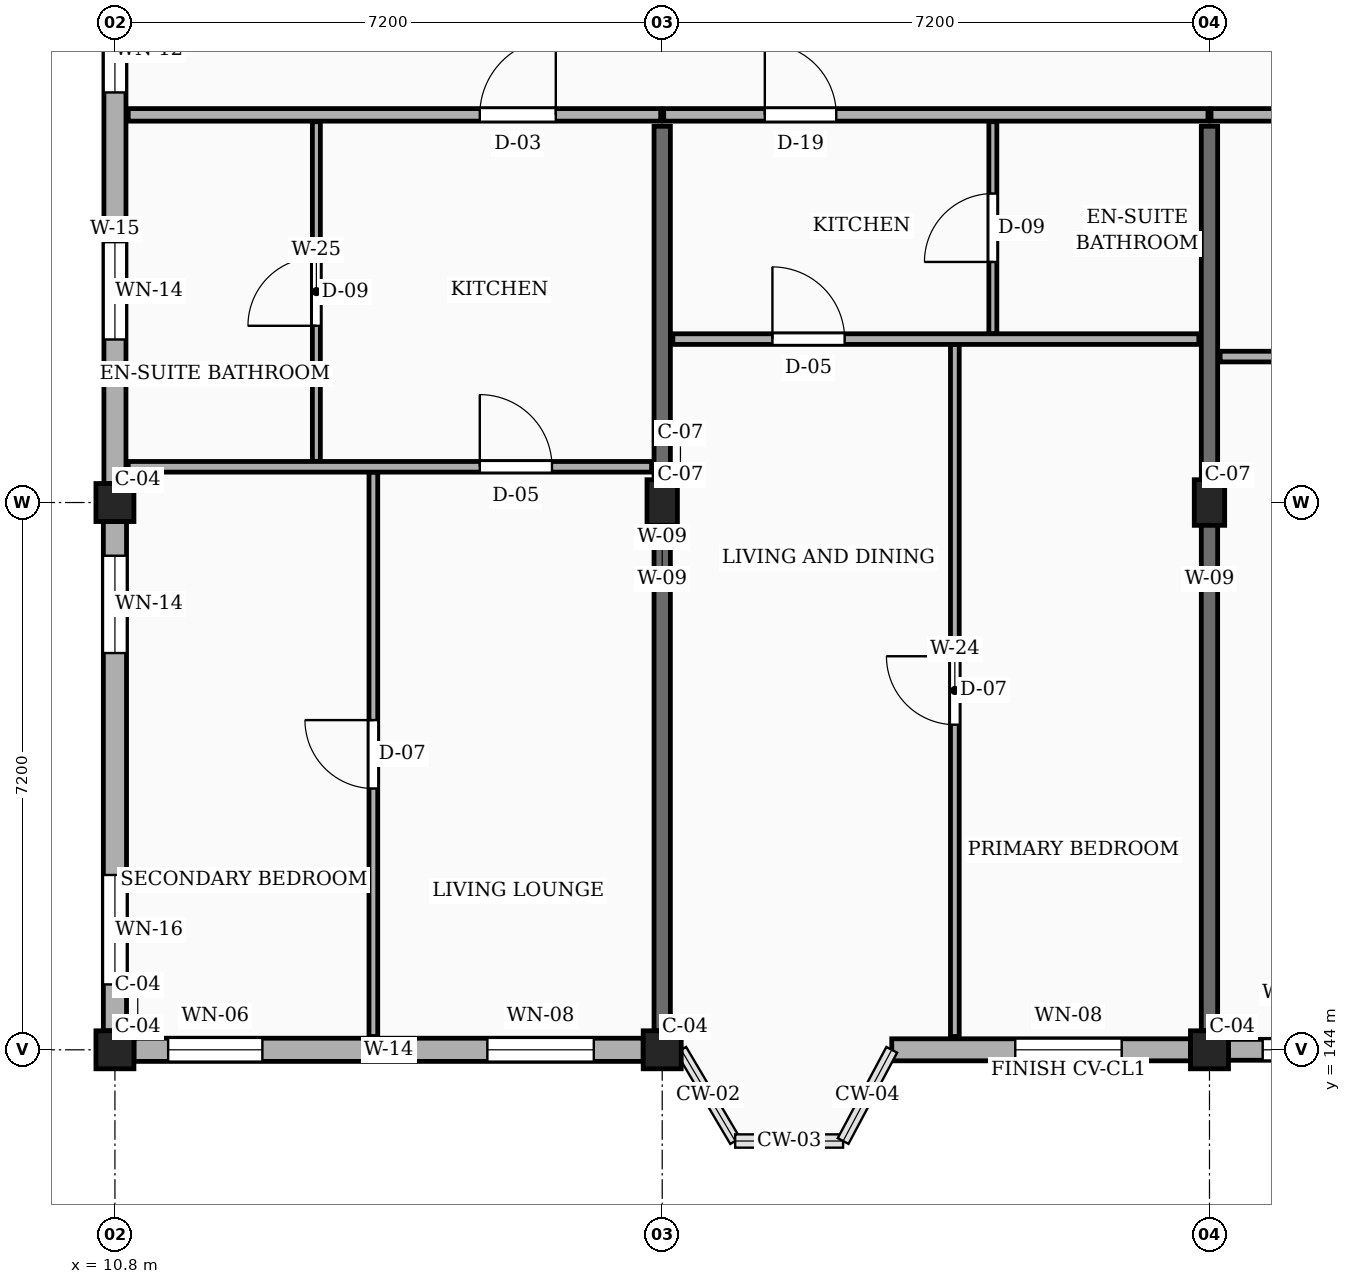
"""IFC4 building model, lengths in metres.
Left out: names, types, materials, properties, quantities, classifications, styles, units other than length and angle.
Written with IfcOpenShell. Run it as: python <this file> out.ifc"""

import sys

from ifc_helpers import new_model, si_unit, direction, frame, frame_2d, origin, origin_2d, place, context, subcontext, project, spatial, rectangle, extrude, element, fill, save


model = new_model("IFC4")
c1 = context("Model", 3, precision=1e-05, world=origin(), true_north=direction((0.0, 1.0)))
c2 = subcontext(c1, "Body", "Model", "MODEL_VIEW")
j1 = project(units=[si_unit("LENGTHUNIT", "METRE"), si_unit("PLANEANGLEUNIT", "RADIAN")], contexts=[c1])
p1 = place(None, origin())
s1 = spatial("IfcSite", under=j1, at=p1, CompositionType="ELEMENT")
p2 = place(p1, origin())
s2 = spatial("IfcBuilding", under=s1, at=p2, CompositionType="ELEMENT")
p3 = place(p2, frame((0.0, 0.0, 29.7)))
s3 = spatial("IfcBuildingStorey", under=s2, at=p3, CompositionType="ELEMENT", Elevation=29.7)
for number, where, z_axis, x_axis in (
    (1, (10.8, 144.0, 0.0), (0.0, 0.0, 1.0), (1.0, 0.0, 0.0)),
    (2, (10.8, 151.2, 0.0), (0.0, 0.0, 1.0), (1.0, 0.0, 0.0)),
    (3, (18.0, 144.0, 0.0), (0.0, 0.0, 1.0), (1.0, 0.0, 0.0)),
):
    element("IfcColumn", number, at=place(p3, frame(where, z_axis=z_axis, x_axis=x_axis)), inside=s3, PredefinedType="COLUMN", context=c2, shape_type="SweptSolid", body=[
        extrude(rectangle(XDim=0.5, YDim=0.5, at=origin_2d()), origin(), (0.0, 0.0, 1.0), 3.15),
    ])
p4 = place(p3, frame((18.0, 151.2, 0.0), z_axis=(0.0, 0.0, 1.0), x_axis=(1.0, 0.0, 0.0)))
e4 = element("IfcColumn", 4, at=p4, inside=s3, PredefinedType="COLUMN", context=c2, shape_type="SweptSolid", body=[
    extrude(rectangle(XDim=0.4, YDim=0.6, at=origin_2d()), origin(), (0.0, 0.0, 1.0), 3.15),
])
p5 = place(p3, frame((25.2, 144.0, 0.0), z_axis=(0.0, 0.0, 1.0), x_axis=(1.0, 0.0, 0.0)))
e5 = element("IfcColumn", 5, at=p5, inside=s3, PredefinedType="COLUMN", context=c2, shape_type="SweptSolid", body=[
    extrude(rectangle(XDim=0.5, YDim=0.5, at=origin_2d()), origin(), (0.0, 0.0, 1.0), 3.15),
])
p6 = place(p3, frame((25.2, 151.2, 0.0), z_axis=(0.0, 0.0, 1.0), x_axis=(1.0, 0.0, 0.0)))
e6 = element("IfcColumn", 6, at=p6, inside=s3, PredefinedType="COLUMN", context=c2, shape_type="SweptSolid", body=[
    extrude(rectangle(XDim=0.4, YDim=0.6, at=origin_2d()), origin(), (0.0, 0.0, 1.0), 3.15),
])
for number, where, z_axis, x_axis in (
    (7, (18.0, 144.25, 0.0), (0.0, 0.0, 1.0), (0.0, 1.0, 0.0)),
    (8, (25.2, 144.25, 0.0), (0.0, 0.0, 1.0), (0.0, 1.0, 0.0)),
):
    element("IfcWall", number, at=place(p3, frame(where, z_axis=z_axis, x_axis=x_axis)), inside=s3, PredefinedType="SOLIDWALL", context=c2, shape_type="SweptSolid", body=[
        extrude(rectangle(XDim=11.9, YDim=0.215, at=frame_2d((5.95, 0.0))), origin(), (0.0, 0.0, 1.0), 2.185),
    ])
p7 = place(p3, frame((11.05, 144.0, 0.0), z_axis=(0.0, 0.0, 1.0), x_axis=(1.0, 0.0, 0.0)))
e9 = element("IfcWall", 9, at=p7, inside=s3, PredefinedType="SOLIDWALL", context=c2, shape_type="SweptSolid", body=[
    extrude(rectangle(XDim=6.7, YDim=0.305, at=frame_2d((3.35, 0.0))), origin(), (0.0, 0.0, 1.0), 2.455),
])
p8 = place(p7, frame((0.45, 0.0, 0.78)))
e10 = element("IfcOpeningElement", 10, at=p8, cuts=e9, PredefinedType="OPENING", context=c2, shape_type="SweptSolid", body=[
    extrude(rectangle(XDim=1.24, YDim=1.15, at=frame_2d((0.62, 0.575))), frame((0.0, 0.163, 0.0), z_axis=(0.0, -1.0, 0.0), x_axis=(1.0, 0.0, 0.0)), (0.0, 0.0, 1.0), 0.325),
])
p9 = place(p7, frame((4.65, 0.0, 0.78)))
e11 = element("IfcOpeningElement", 11, at=p9, cuts=e9, PredefinedType="OPENING", context=c2, shape_type="SweptSolid", body=[
    extrude(rectangle(XDim=1.4, YDim=1.15, at=frame_2d((0.7, 0.575))), frame((0.0, 0.163, 0.0), z_axis=(0.0, -1.0, 0.0), x_axis=(1.0, 0.0, 0.0)), (0.0, 0.0, 1.0), 0.325),
])
p10 = place(p3, frame((21.02, 144.0, 0.0), z_axis=(0.0, 0.0, 1.0), x_axis=(1.0, 0.0, 0.0)))
e12 = element("IfcWall", 12, at=p10, inside=s3, PredefinedType="SOLIDWALL", context=c2, shape_type="SweptSolid", body=[
    extrude(rectangle(XDim=3.93, YDim=0.29, at=frame_2d((1.965, 0.0))), origin(), (0.0, 0.0, 1.0), 2.455),
])
p11 = place(p10, frame((1.625, 0.0, 0.78)))
e13 = element("IfcOpeningElement", 13, at=p11, cuts=e12, PredefinedType="OPENING", context=c2, shape_type="SweptSolid", body=[
    extrude(rectangle(XDim=1.4, YDim=1.15, at=frame_2d((0.7, 0.575))), frame((0.0, 0.155, 0.0), z_axis=(0.0, -1.0, 0.0), x_axis=(1.0, 0.0, 0.0)), (0.0, 0.0, 1.0), 0.31),
])
p12 = place(p3, frame((25.45, 144.0, 0.0), z_axis=(0.0, 0.0, 1.0), x_axis=(1.0, 0.0, 0.0)))
e14 = element("IfcWall", 14, at=p12, inside=s3, PredefinedType="SOLIDWALL", context=c2, shape_type="SweptSolid", body=[
    extrude(rectangle(XDim=6.7, YDim=0.275, at=frame_2d((3.35, 0.0))), origin(), (0.0, 0.0, 1.0), 2.455),
])
p13 = place(p12, frame((0.45, 0.0, 0.78)))
e15 = element("IfcOpeningElement", 15, at=p13, cuts=e14, PredefinedType="OPENING", context=c2, shape_type="SweptSolid", body=[
    extrude(rectangle(XDim=0.88, YDim=1.26, at=frame_2d((0.44, 0.63))), frame((0.0, 0.147, 0.0), z_axis=(0.0, -1.0, 0.0), x_axis=(1.0, 0.0, 0.0)), (0.0, 0.0, 1.0), 0.295),
])
p14 = place(p12, frame((4.65, 0.0, 0.78)))
e16 = element("IfcOpeningElement", 16, at=p14, cuts=e14, PredefinedType="OPENING", context=c2, shape_type="SweptSolid", body=[
    extrude(rectangle(XDim=1.04, YDim=1.26, at=frame_2d((0.52, 0.63))), frame((0.0, 0.147, 0.0), z_axis=(0.0, -1.0, 0.0), x_axis=(1.0, 0.0, 0.0)), (0.0, 0.0, 1.0), 0.295),
])
p15 = place(p3, frame((10.8, 158.15, 0.0), z_axis=(0.0, 0.0, 1.0), x_axis=(0.0, -1.0, 0.0)))
e17 = element("IfcWall", 17, at=p15, inside=s3, PredefinedType="SOLIDWALL", context=c2, shape_type="SweptSolid", body=[
    extrude(rectangle(XDim=6.7, YDim=0.29, at=frame_2d((3.35, 0.0))), origin(), (0.0, 0.0, 1.0), 2.455),
])
p16 = place(p15, frame((0.435, 0.0, 0.78)))
e18 = element("IfcOpeningElement", 18, at=p16, cuts=e17, PredefinedType="OPENING", context=c2, shape_type="SweptSolid", body=[
    extrude(rectangle(XDim=1.12, YDim=1.26, at=frame_2d((0.56, 0.63))), frame((0.0, 0.155, 0.0), z_axis=(0.0, -1.0, 0.0), x_axis=(1.0, 0.0, 0.0)), (0.0, 0.0, 1.0), 0.31),
])
p17 = place(p15, frame((3.525, 0.0, 0.78)))
e19 = element("IfcOpeningElement", 19, at=p17, cuts=e17, PredefinedType="OPENING", context=c2, shape_type="SweptSolid", body=[
    extrude(rectangle(XDim=1.28, YDim=1.26, at=frame_2d((0.64, 0.63))), frame((0.0, 0.155, 0.0), z_axis=(0.0, -1.0, 0.0), x_axis=(1.0, 0.0, 0.0)), (0.0, 0.0, 1.0), 0.31),
])
p18 = place(p3, frame((10.8, 150.95, 0.0), z_axis=(0.0, 0.0, 1.0), x_axis=(0.0, -1.0, 0.0)))
e20 = element("IfcWall", 20, at=p18, inside=s3, PredefinedType="SOLIDWALL", context=c2, shape_type="SweptSolid", body=[
    extrude(rectangle(XDim=6.7, YDim=0.305, at=frame_2d((3.35, 0.0))), origin(), (0.0, 0.0, 1.0), 2.455),
])
p19 = place(p18, frame((0.45, 0.0, 0.78)))
e21 = element("IfcOpeningElement", 21, at=p19, cuts=e20, PredefinedType="OPENING", context=c2, shape_type="SweptSolid", body=[
    extrude(rectangle(XDim=1.28, YDim=1.26, at=frame_2d((0.64, 0.63))), frame((0.0, 0.163, 0.0), z_axis=(0.0, -1.0, 0.0), x_axis=(1.0, 0.0, 0.0)), (0.0, 0.0, 1.0), 0.325),
])
p20 = place(p18, frame((4.65, 0.0, 0.78)))
e22 = element("IfcOpeningElement", 22, at=p20, cuts=e20, PredefinedType="OPENING", context=c2, shape_type="SweptSolid", body=[
    extrude(rectangle(XDim=1.44, YDim=1.26, at=frame_2d((0.72, 0.63))), frame((0.0, 0.163, 0.0), z_axis=(0.0, -1.0, 0.0), x_axis=(1.0, 0.0, 0.0)), (0.0, 0.0, 1.0), 0.325),
])
p21 = place(p3, frame((10.975, 156.3, 0.0), z_axis=(0.0, 0.0, 1.0), x_axis=(1.0, 0.0, 0.0)))
e23 = element("IfcWall", 23, at=p21, inside=s3, PredefinedType="PARTITIONING", context=c2, shape_type="SweptSolid", body=[
    extrude(rectangle(XDim=7.005, YDim=0.165, at=frame_2d((3.502, 0.0))), origin(), (0.0, 0.0, 1.0), 2.32),
])
p22 = place(p21, frame((4.625, 0.0, 0.0)))
e24 = element("IfcOpeningElement", 24, at=p22, cuts=e23, PredefinedType="OPENING", context=c2, shape_type="SweptSolid", body=[
    extrude(rectangle(XDim=1.0, YDim=2.15, at=frame_2d((0.5, 1.075))), frame((0.0, 0.093, 0.0), z_axis=(0.0, -1.0, 0.0), x_axis=(1.0, 0.0, 0.0)), (0.0, 0.0, 1.0), 0.185),
])
p23 = place(p3, frame((18.02, 156.3, 0.0), z_axis=(0.0, 0.0, 1.0), x_axis=(1.0, 0.0, 0.0)))
e25 = element("IfcWall", 25, at=p23, inside=s3, PredefinedType="PARTITIONING", context=c2, shape_type="SweptSolid", body=[
    extrude(rectangle(XDim=7.16, YDim=0.165, at=frame_2d((3.58, 0.0))), origin(), (0.0, 0.0, 1.0), 2.32),
])
p24 = place(p23, frame((1.33, 0.0, 0.0)))
e26 = element("IfcOpeningElement", 26, at=p24, cuts=e25, PredefinedType="OPENING", context=c2, shape_type="SweptSolid", body=[
    extrude(rectangle(XDim=0.94, YDim=2.12, at=frame_2d((0.47, 1.06))), frame((0.0, 0.093, 0.0), z_axis=(0.0, -1.0, 0.0), x_axis=(1.0, 0.0, 0.0)), (0.0, 0.0, 1.0), 0.185),
])
p25 = place(p3, frame((25.22, 156.3, 0.0), z_axis=(0.0, 0.0, 1.0), x_axis=(1.0, 0.0, 0.0)))
e27 = element("IfcWall", 27, at=p25, inside=s3, PredefinedType="PARTITIONING", context=c2, shape_type="SweptSolid", body=[
    extrude(rectangle(XDim=7.16, YDim=0.165, at=frame_2d((3.58, 0.0))), origin(), (0.0, 0.0, 1.0), 2.32),
])
p26 = place(p25, frame((1.33, 0.0, 0.0)))
e28 = element("IfcOpeningElement", 28, at=p26, cuts=e27, PredefinedType="OPENING", context=c2, shape_type="SweptSolid", body=[
    extrude(rectangle(XDim=1.14, YDim=2.18, at=frame_2d((0.57, 1.09))), frame((0.0, 0.093, 0.0), z_axis=(0.0, -1.0, 0.0), x_axis=(1.0, 0.0, 0.0)), (0.0, 0.0, 1.0), 0.185),
])
p27 = place(p3, frame((14.2, 144.175, 0.0), z_axis=(0.0, 0.0, 1.0), x_axis=(0.0, 1.0, 0.0)))
e29 = element("IfcWall", 29, at=p27, inside=s3, PredefinedType="PARTITIONING", context=c2, shape_type="SweptSolid", body=[
    extrude(rectangle(XDim=7.425, YDim=0.115, at=frame_2d((3.712, 0.0))), origin(), (0.0, 0.0, 1.0), 2.32),
])
p28 = place(p27, frame((3.262, 0.0, 0.0)))
e30 = element("IfcOpeningElement", 30, at=p28, cuts=e29, PredefinedType="OPENING", context=c2, shape_type="SweptSolid", body=[
    extrude(rectangle(XDim=0.9, YDim=2.1, at=frame_2d((0.45, 1.05))), frame((0.0, 0.067, 0.0), z_axis=(0.0, -1.0, 0.0), x_axis=(1.0, 0.0, 0.0)), (0.0, 0.0, 1.0), 0.135),
])
p29 = place(p3, frame((13.45, 151.74, 0.0), z_axis=(0.0, 0.0, 1.0), x_axis=(0.0, 1.0, 0.0)))
e31 = element("IfcWall", 31, at=p29, inside=s3, PredefinedType="PARTITIONING", context=c2, shape_type="SweptSolid", body=[
    extrude(rectangle(XDim=4.47, YDim=0.105, at=frame_2d((2.235, 0.0))), origin(), (0.0, 0.0, 1.0), 2.32),
])
p30 = place(p29, frame((1.785, 0.0, 0.0)))
e32 = element("IfcOpeningElement", 32, at=p30, cuts=e31, PredefinedType="OPENING", context=c2, shape_type="SweptSolid", body=[
    extrude(rectangle(XDim=0.9, YDim=2.05, at=frame_2d((0.45, 1.025))), frame((0.0, 0.062, 0.0), z_axis=(0.0, -1.0, 0.0), x_axis=(1.0, 0.0, 0.0)), (0.0, 0.0, 1.0), 0.125),
])
p31 = place(p3, frame((10.975, 151.67, 0.0), z_axis=(0.0, 0.0, 1.0), x_axis=(1.0, 0.0, 0.0)))
e33 = element("IfcWall", 33, at=p31, inside=s3, PredefinedType="PARTITIONING", context=c2, shape_type="SweptSolid", body=[
    extrude(rectangle(XDim=6.885, YDim=0.14, at=frame_2d((3.442, 0.0))), origin(), (0.0, 0.0, 1.0), 2.32),
])
p32 = place(p31, frame((4.625, 0.0, 0.0)))
e34 = element("IfcOpeningElement", 34, at=p32, cuts=e33, PredefinedType="OPENING", context=c2, shape_type="SweptSolid", body=[
    extrude(rectangle(XDim=0.95, YDim=2.1, at=frame_2d((0.475, 1.05))), frame((0.0, 0.08, 0.0), z_axis=(0.0, -1.0, 0.0), x_axis=(1.0, 0.0, 0.0)), (0.0, 0.0, 1.0), 0.16),
])
p33 = place(p3, frame((21.85, 144.175, 0.0), z_axis=(0.0, 0.0, 1.0), x_axis=(0.0, 1.0, 0.0)))
e35 = element("IfcWall", 35, at=p33, inside=s3, PredefinedType="PARTITIONING", context=c2, shape_type="SweptSolid", body=[
    extrude(rectangle(XDim=9.105, YDim=0.115, at=frame_2d((4.552, 0.0))), origin(), (0.0, 0.0, 1.0), 2.32),
])
p34 = place(p33, frame((4.103, 0.0, 0.0)))
e36 = element("IfcOpeningElement", 36, at=p34, cuts=e35, PredefinedType="OPENING", context=c2, shape_type="SweptSolid", body=[
    extrude(rectangle(XDim=0.9, YDim=2.1, at=frame_2d((0.45, 1.05))), frame((0.0, 0.067, 0.0), z_axis=(0.0, -1.0, 0.0), x_axis=(1.0, 0.0, 0.0)), (0.0, 0.0, 1.0), 0.135),
])
p35 = place(p3, frame((22.35, 153.42, 0.0), z_axis=(0.0, 0.0, 1.0), x_axis=(0.0, 1.0, 0.0)))
e37 = element("IfcWall", 37, at=p35, inside=s3, PredefinedType="PARTITIONING", context=c2, shape_type="SweptSolid", body=[
    extrude(rectangle(XDim=2.79, YDim=0.105, at=frame_2d((1.395, 0.0))), origin(), (0.0, 0.0, 1.0), 2.32),
])
p36 = place(p35, frame((0.945, 0.0, 0.0)))
e38 = element("IfcOpeningElement", 38, at=p36, cuts=e37, PredefinedType="OPENING", context=c2, shape_type="SweptSolid", body=[
    extrude(rectangle(XDim=0.9, YDim=2.05, at=frame_2d((0.45, 1.025))), frame((0.0, 0.062, 0.0), z_axis=(0.0, -1.0, 0.0), x_axis=(1.0, 0.0, 0.0)), (0.0, 0.0, 1.0), 0.125),
])
p37 = place(p3, frame((18.14, 153.35, 0.0), z_axis=(0.0, 0.0, 1.0), x_axis=(1.0, 0.0, 0.0)))
e39 = element("IfcWall", 39, at=p37, inside=s3, PredefinedType="PARTITIONING", context=c2, shape_type="SweptSolid", body=[
    extrude(rectangle(XDim=6.92, YDim=0.14, at=frame_2d((3.46, 0.0))), origin(), (0.0, 0.0, 1.0), 2.32),
])
p38 = place(p37, frame((1.31, 0.0, 0.0)))
e40 = element("IfcOpeningElement", 40, at=p38, cuts=e39, PredefinedType="OPENING", context=c2, shape_type="SweptSolid", body=[
    extrude(rectangle(XDim=0.95, YDim=2.1, at=frame_2d((0.475, 1.05))), frame((0.0, 0.08, 0.0), z_axis=(0.0, -1.0, 0.0), x_axis=(1.0, 0.0, 0.0)), (0.0, 0.0, 1.0), 0.16),
])
p39 = place(p3, frame((25.34, 153.12, 0.0), z_axis=(0.0, 0.0, 1.0), x_axis=(1.0, 0.0, 0.0)))
e41 = element("IfcWall", 41, at=p39, inside=s3, PredefinedType="PARTITIONING", context=c2, shape_type="SweptSolid", body=[
    extrude(rectangle(XDim=6.92, YDim=0.14, at=frame_2d((3.46, 0.0))), origin(), (0.0, 0.0, 1.0), 2.32),
])
p40 = place(p39, frame((1.31, 0.0, 0.0)))
e42 = element("IfcOpeningElement", 42, at=p40, cuts=e41, PredefinedType="OPENING", context=c2, shape_type="SweptSolid", body=[
    extrude(rectangle(XDim=0.92, YDim=2.1, at=frame_2d((0.46, 1.05))), frame((0.0, 0.08, 0.0), z_axis=(0.0, -1.0, 0.0), x_axis=(1.0, 0.0, 0.0)), (0.0, 0.0, 1.0), 0.16),
])
p41 = place(p8, origin())
e43 = element("IfcWindow", 43, at=p41, inside=s3, PartitioningType="SINGLE_PANEL", PredefinedType="WINDOW", context=c2, shape_type="SweptSolid", body=[
    extrude(rectangle(XDim=1.24, YDim=1.15, at=frame_2d((0.62, 0.575))), frame((0.0, 0.03, 0.0), z_axis=(0.0, -1.0, 0.0), x_axis=(1.0, 0.0, 0.0)), (0.0, 0.0, 1.0), 0.06),
])
fill(e10, e43)
p42 = place(p9, origin())
e44 = element("IfcWindow", 44, at=p42, inside=s3, PartitioningType="SINGLE_PANEL", PredefinedType="WINDOW", context=c2, shape_type="SweptSolid", body=[
    extrude(rectangle(XDim=1.4, YDim=1.15, at=frame_2d((0.7, 0.575))), frame((0.0, 0.03, 0.0), z_axis=(0.0, -1.0, 0.0), x_axis=(1.0, 0.0, 0.0)), (0.0, 0.0, 1.0), 0.06),
])
fill(e11, e44)
p43 = place(p11, origin())
e45 = element("IfcWindow", 45, at=p43, inside=s3, PartitioningType="SINGLE_PANEL", PredefinedType="WINDOW", context=c2, shape_type="SweptSolid", body=[
    extrude(rectangle(XDim=1.4, YDim=1.15, at=frame_2d((0.7, 0.575))), frame((0.0, 0.03, 0.0), z_axis=(0.0, -1.0, 0.0), x_axis=(1.0, 0.0, 0.0)), (0.0, 0.0, 1.0), 0.06),
])
fill(e13, e45)
p44 = place(p13, origin())
e46 = element("IfcWindow", 46, at=p44, inside=s3, PartitioningType="SINGLE_PANEL", PredefinedType="WINDOW", context=c2, shape_type="SweptSolid", body=[
    extrude(rectangle(XDim=0.88, YDim=1.26, at=frame_2d((0.44, 0.63))), frame((0.0, 0.03, 0.0), z_axis=(0.0, -1.0, 0.0), x_axis=(1.0, 0.0, 0.0)), (0.0, 0.0, 1.0), 0.06),
])
fill(e15, e46)
p45 = place(p16, origin())
e47 = element("IfcWindow", 47, at=p45, inside=s3, PartitioningType="SINGLE_PANEL", PredefinedType="WINDOW", context=c2, shape_type="SweptSolid", body=[
    extrude(rectangle(XDim=1.12, YDim=1.26, at=frame_2d((0.56, 0.63))), frame((0.0, 0.03, 0.0), z_axis=(0.0, -1.0, 0.0), x_axis=(1.0, 0.0, 0.0)), (0.0, 0.0, 1.0), 0.06),
])
fill(e18, e47)
p46 = place(p17, origin())
e48 = element("IfcWindow", 48, at=p46, inside=s3, PartitioningType="SINGLE_PANEL", PredefinedType="WINDOW", context=c2, shape_type="SweptSolid", body=[
    extrude(rectangle(XDim=1.28, YDim=1.26, at=frame_2d((0.64, 0.63))), frame((0.0, 0.03, 0.0), z_axis=(0.0, -1.0, 0.0), x_axis=(1.0, 0.0, 0.0)), (0.0, 0.0, 1.0), 0.06),
])
fill(e19, e48)
p47 = place(p19, origin())
e49 = element("IfcWindow", 49, at=p47, inside=s3, PartitioningType="SINGLE_PANEL", PredefinedType="WINDOW", context=c2, shape_type="SweptSolid", body=[
    extrude(rectangle(XDim=1.28, YDim=1.26, at=frame_2d((0.64, 0.63))), frame((0.0, 0.03, 0.0), z_axis=(0.0, -1.0, 0.0), x_axis=(1.0, 0.0, 0.0)), (0.0, 0.0, 1.0), 0.06),
])
fill(e21, e49)
p48 = place(p20, origin())
e50 = element("IfcWindow", 50, at=p48, inside=s3, PartitioningType="SINGLE_PANEL", PredefinedType="WINDOW", context=c2, shape_type="SweptSolid", body=[
    extrude(rectangle(XDim=1.44, YDim=1.26, at=frame_2d((0.72, 0.63))), frame((0.0, 0.03, 0.0), z_axis=(0.0, -1.0, 0.0), x_axis=(1.0, 0.0, 0.0)), (0.0, 0.0, 1.0), 0.06),
])
fill(e22, e50)
p49 = place(p22, origin())
e51 = element("IfcDoor", 51, at=p49, inside=s3, OperationType="SINGLE_SWING_RIGHT", PredefinedType="DOOR", context=c2, shape_type="SweptSolid", body=[
    extrude(rectangle(XDim=1.0, YDim=2.15, at=frame_2d((0.5, 1.075))), frame((0.0, 0.025, 0.0), z_axis=(0.0, -1.0, 0.0), x_axis=(1.0, 0.0, 0.0)), (0.0, 0.0, 1.0), 0.05),
])
fill(e24, e51)
p50 = place(p24, origin())
e52 = element("IfcDoor", 52, at=p50, inside=s3, OperationType="SINGLE_SWING_LEFT", PredefinedType="DOOR", context=c2, shape_type="SweptSolid", body=[
    extrude(rectangle(XDim=0.94, YDim=2.12, at=frame_2d((0.47, 1.06))), frame((0.0, 0.025, 0.0), z_axis=(0.0, -1.0, 0.0), x_axis=(1.0, 0.0, 0.0)), (0.0, 0.0, 1.0), 0.05),
])
fill(e26, e52)
p51 = place(p28, origin())
e53 = element("IfcDoor", 53, at=p51, inside=s3, OperationType="SINGLE_SWING_RIGHT", PredefinedType="DOOR", context=c2, shape_type="SweptSolid", body=[
    extrude(rectangle(XDim=0.9, YDim=2.1, at=frame_2d((0.45, 1.05))), frame((0.0, 0.025, 0.0), z_axis=(0.0, -1.0, 0.0), x_axis=(1.0, 0.0, 0.0)), (0.0, 0.0, 1.0), 0.05),
])
fill(e30, e53)
p52 = place(p30, origin())
e54 = element("IfcDoor", 54, at=p52, inside=s3, OperationType="SINGLE_SWING_LEFT", PredefinedType="DOOR", context=c2, shape_type="SweptSolid", body=[
    extrude(rectangle(XDim=0.9, YDim=2.05, at=frame_2d((0.45, 1.025))), frame((0.0, 0.025, 0.0), z_axis=(0.0, -1.0, 0.0), x_axis=(1.0, 0.0, 0.0)), (0.0, 0.0, 1.0), 0.05),
])
fill(e32, e54)
p53 = place(p32, origin())
e55 = element("IfcDoor", 55, at=p53, inside=s3, OperationType="SINGLE_SWING_LEFT", PredefinedType="DOOR", context=c2, shape_type="SweptSolid", body=[
    extrude(rectangle(XDim=0.95, YDim=2.1, at=frame_2d((0.475, 1.05))), frame((0.0, 0.025, 0.0), z_axis=(0.0, -1.0, 0.0), x_axis=(1.0, 0.0, 0.0)), (0.0, 0.0, 1.0), 0.05),
])
fill(e34, e55)
p54 = place(p34, origin())
e56 = element("IfcDoor", 56, at=p54, inside=s3, OperationType="SINGLE_SWING_RIGHT", PredefinedType="DOOR", context=c2, shape_type="SweptSolid", body=[
    extrude(rectangle(XDim=0.9, YDim=2.1, at=frame_2d((0.45, 1.05))), frame((0.0, 0.025, 0.0), z_axis=(0.0, -1.0, 0.0), x_axis=(1.0, 0.0, 0.0)), (0.0, 0.0, 1.0), 0.05),
])
fill(e36, e56)
p55 = place(p36, origin())
e57 = element("IfcDoor", 57, at=p55, inside=s3, OperationType="SINGLE_SWING_LEFT", PredefinedType="DOOR", context=c2, shape_type="SweptSolid", body=[
    extrude(rectangle(XDim=0.9, YDim=2.05, at=frame_2d((0.45, 1.025))), frame((0.0, 0.025, 0.0), z_axis=(0.0, -1.0, 0.0), x_axis=(1.0, 0.0, 0.0)), (0.0, 0.0, 1.0), 0.05),
])
fill(e38, e57)
p56 = place(p38, origin())
e58 = element("IfcDoor", 58, at=p56, inside=s3, OperationType="SINGLE_SWING_LEFT", PredefinedType="DOOR", context=c2, shape_type="SweptSolid", body=[
    extrude(rectangle(XDim=0.95, YDim=2.1, at=frame_2d((0.475, 1.05))), frame((0.0, 0.025, 0.0), z_axis=(0.0, -1.0, 0.0), x_axis=(1.0, 0.0, 0.0)), (0.0, 0.0, 1.0), 0.05),
])
fill(e40, e58)
save(model, sys.argv[1])
